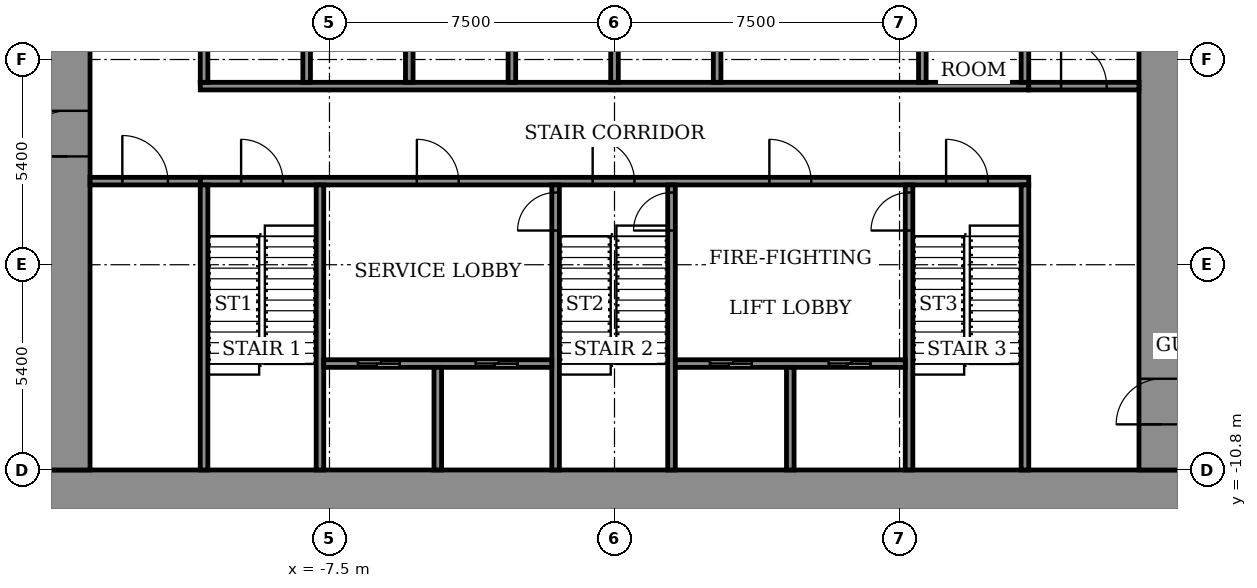
"""IFC4 building model, lengths in metres.
Left out: names, types, materials, properties, quantities, classifications, styles, units other than length and angle.
Written with IfcOpenShell. Run it as: python <this file> out.ifc"""

import sys

from ifc_helpers import new_model, si_unit, direction, frame, frame_2d, origin, place, context, subcontext, project, spatial, rectangle, extrude, element, fill, save


model = new_model("IFC4")
c1 = context("Model", 3, precision=1e-05, world=origin(), true_north=direction((0.0, 1.0)))
c2 = subcontext(c1, "Body", "Model", "MODEL_VIEW")
j1 = project(units=[si_unit("LENGTHUNIT", "METRE"), si_unit("PLANEANGLEUNIT", "RADIAN")], contexts=[c1])
p1 = place(None, origin())
s1 = spatial("IfcSite", under=j1, at=p1, CompositionType="ELEMENT")
p2 = place(p1, origin())
s2 = spatial("IfcBuilding", under=s1, at=p2, CompositionType="ELEMENT")
p3 = place(p2, frame((0.0, 0.0, 16.0)))
s3 = spatial("IfcBuildingStorey", under=s2, at=p3, CompositionType="ELEMENT", Elevation=16.0)
p4 = place(p3, frame((-15.0, -11.4, 0.0), z_axis=(0.0, 0.0, 1.0), x_axis=(1.0, 0.0, 0.0)))
e1 = element("IfcWall", 1, at=p4, inside=s3, PredefinedType="SHEAR", context=c2, shape_type="SweptSolid", body=[
    extrude(rectangle(XDim=30.0, YDim=1.2, at=frame_2d((15.0, 0.0))), origin(), (0.0, 0.0, 1.0), 4.5),
])
p5 = place(p3, frame((-14.4, -10.8, 0.0), z_axis=(0.0, 0.0, 1.0), x_axis=(0.0, 1.0, 0.0)))
e2 = element("IfcWall", 2, at=p5, inside=s3, PredefinedType="SHEAR", context=c2, shape_type="SweptSolid", body=[
    extrude(rectangle(XDim=21.6, YDim=1.2, at=frame_2d((10.8, 0.0))), origin(), (0.0, 0.0, 1.0), 4.5),
])
p6 = place(p5, frame((8.25, 0.0, 0.0)))
e3 = element("IfcOpeningElement", 3, at=p6, cuts=e2, PredefinedType="OPENING", context=c2, shape_type="SweptSolid", body=[
    extrude(rectangle(XDim=1.2, YDim=2.1, at=frame_2d((0.6, 1.05))), frame((0.0, 0.61, 0.0), z_axis=(0.0, -1.0, 0.0), x_axis=(1.0, 0.0, 0.0)), (0.0, 0.0, 1.0), 1.22),
])
p7 = place(p5, frame((15.25, 0.0, 0.0)))
e4 = element("IfcOpeningElement", 4, at=p7, cuts=e2, PredefinedType="OPENING", context=c2, shape_type="SweptSolid", body=[
    extrude(rectangle(XDim=1.2, YDim=2.1, at=frame_2d((0.6, 1.05))), frame((0.0, 0.61, 0.0), z_axis=(0.0, -1.0, 0.0), x_axis=(1.0, 0.0, 0.0)), (0.0, 0.0, 1.0), 1.22),
])
p8 = place(p3, frame((14.4, -10.8, 0.0), z_axis=(0.0, 0.0, 1.0), x_axis=(0.0, 1.0, 0.0)))
e5 = element("IfcWall", 5, at=p8, inside=s3, PredefinedType="SHEAR", context=c2, shape_type="SweptSolid", body=[
    extrude(rectangle(XDim=21.6, YDim=1.2, at=frame_2d((10.8, 0.0))), origin(), (0.0, 0.0, 1.0), 4.5),
])
p9 = place(p8, frame((1.2, 0.0, 0.0)))
e6 = element("IfcOpeningElement", 6, at=p9, cuts=e5, PredefinedType="OPENING", context=c2, shape_type="SweptSolid", body=[
    extrude(rectangle(XDim=1.2, YDim=2.1, at=frame_2d((0.6, 1.05))), frame((0.0, 0.61, 0.0), z_axis=(0.0, -1.0, 0.0), x_axis=(1.0, 0.0, 0.0)), (0.0, 0.0, 1.0), 1.22),
])
p10 = place(p3, frame((-10.9, -3.2, 0.0), z_axis=(0.0, 0.0, 1.0), x_axis=(1.0, 0.0, 0.0)))
e7 = element("IfcWall", 7, at=p10, inside=s3, PredefinedType="SHEAR", context=c2, shape_type="SweptSolid", body=[
    extrude(rectangle(XDim=21.8, YDim=0.2, at=frame_2d((10.9, 0.0))), origin(), (0.0, 0.0, 1.0), 3.95),
])
p11 = place(p10, frame((1.075, 0.0, 0.0)))
e8 = element("IfcOpeningElement", 8, at=p11, cuts=e7, PredefinedType="OPENING", context=c2, shape_type="SweptSolid", body=[
    extrude(rectangle(XDim=1.1, YDim=2.1, at=frame_2d((0.55, 1.05))), frame((0.0, 0.11, 0.0), z_axis=(0.0, -1.0, 0.0), x_axis=(1.0, 0.0, 0.0)), (0.0, 0.0, 1.0), 0.22),
])
p12 = place(p10, frame((10.325, 0.0, 0.0)))
e9 = element("IfcOpeningElement", 9, at=p12, cuts=e7, PredefinedType="OPENING", context=c2, shape_type="SweptSolid", body=[
    extrude(rectangle(XDim=1.1, YDim=2.1, at=frame_2d((0.55, 1.05))), frame((0.0, 0.11, 0.0), z_axis=(0.0, -1.0, 0.0), x_axis=(1.0, 0.0, 0.0)), (0.0, 0.0, 1.0), 0.22),
])
p13 = place(p10, frame((19.625, 0.0, 0.0)))
e10 = element("IfcOpeningElement", 10, at=p13, cuts=e7, PredefinedType="OPENING", context=c2, shape_type="SweptSolid", body=[
    extrude(rectangle(XDim=1.1, YDim=2.1, at=frame_2d((0.55, 1.05))), frame((0.0, 0.11, 0.0), z_axis=(0.0, -1.0, 0.0), x_axis=(1.0, 0.0, 0.0)), (0.0, 0.0, 1.0), 0.22),
])
p14 = place(p10, frame((5.7, 0.0, 0.0)))
e11 = element("IfcOpeningElement", 11, at=p14, cuts=e7, PredefinedType="OPENING", context=c2, shape_type="SweptSolid", body=[
    extrude(rectangle(XDim=1.1, YDim=2.1, at=frame_2d((0.55, 1.05))), frame((0.0, 0.11, 0.0), z_axis=(0.0, -1.0, 0.0), x_axis=(1.0, 0.0, 0.0)), (0.0, 0.0, 1.0), 0.22),
])
p15 = place(p10, frame((14.975, 0.0, 0.0)))
e12 = element("IfcOpeningElement", 12, at=p15, cuts=e7, PredefinedType="OPENING", context=c2, shape_type="SweptSolid", body=[
    extrude(rectangle(XDim=1.1, YDim=2.1, at=frame_2d((0.55, 1.05))), frame((0.0, 0.11, 0.0), z_axis=(0.0, -1.0, 0.0), x_axis=(1.0, 0.0, 0.0)), (0.0, 0.0, 1.0), 0.22),
])
p16 = place(p3, frame((-10.9, -0.7, 0.0), z_axis=(0.0, 0.0, 1.0), x_axis=(1.0, 0.0, 0.0)))
e13 = element("IfcWall", 13, at=p16, inside=s3, PredefinedType="SHEAR", context=c2, shape_type="SweptSolid", body=[
    extrude(rectangle(XDim=21.8, YDim=0.2, at=frame_2d((10.9, 0.0))), origin(), (0.0, 0.0, 1.0), 3.95),
])
for number, where, z_axis, x_axis in (
    (14, (-10.8, -10.8, 0.0), (0.0, 0.0, 1.0), (0.0, 1.0, 0.0)),
    (15, (-7.75, -10.8, 0.0), (0.0, 0.0, 1.0), (0.0, 1.0, 0.0)),
):
    element("IfcWall", number, at=place(p3, frame(where, z_axis=z_axis, x_axis=x_axis)), inside=s3, PredefinedType="SHEAR", context=c2, shape_type="SweptSolid", body=[
        extrude(rectangle(XDim=7.5, YDim=0.2, at=frame_2d((3.75, 0.0))), origin(), (0.0, 0.0, 1.0), 3.95),
    ])
p17 = place(p3, frame((-1.55, -10.8, 0.0), z_axis=(0.0, 0.0, 1.0), x_axis=(0.0, 1.0, 0.0)))
e16 = element("IfcWall", 16, at=p17, inside=s3, PredefinedType="SHEAR", context=c2, shape_type="SweptSolid", body=[
    extrude(rectangle(XDim=7.5, YDim=0.2, at=frame_2d((3.75, 0.0))), origin(), (0.0, 0.0, 1.0), 3.95),
])
p18 = place(p17, frame((6.3, 0.0, 0.0)))
e17 = element("IfcOpeningElement", 17, at=p18, cuts=e16, PredefinedType="OPENING", context=c2, shape_type="SweptSolid", body=[
    extrude(rectangle(XDim=1.0, YDim=2.1, at=frame_2d((0.5, 1.05))), frame((0.0, 0.11, 0.0), z_axis=(0.0, -1.0, 0.0), x_axis=(1.0, 0.0, 0.0)), (0.0, 0.0, 1.0), 0.22),
])
p19 = place(p3, frame((1.5, -10.8, 0.0), z_axis=(0.0, 0.0, 1.0), x_axis=(0.0, 1.0, 0.0)))
e18 = element("IfcWall", 18, at=p19, inside=s3, PredefinedType="SHEAR", context=c2, shape_type="SweptSolid", body=[
    extrude(rectangle(XDim=7.5, YDim=0.2, at=frame_2d((3.75, 0.0))), origin(), (0.0, 0.0, 1.0), 3.95),
])
p20 = place(p19, frame((6.3, 0.0, 0.0)))
e19 = element("IfcOpeningElement", 19, at=p20, cuts=e18, PredefinedType="OPENING", context=c2, shape_type="SweptSolid", body=[
    extrude(rectangle(XDim=1.0, YDim=2.1, at=frame_2d((0.5, 1.05))), frame((0.0, 0.11, 0.0), z_axis=(0.0, -1.0, 0.0), x_axis=(1.0, 0.0, 0.0)), (0.0, 0.0, 1.0), 0.22),
])
p21 = place(p3, frame((7.75, -10.8, 0.0), z_axis=(0.0, 0.0, 1.0), x_axis=(0.0, 1.0, 0.0)))
e20 = element("IfcWall", 20, at=p21, inside=s3, PredefinedType="SHEAR", context=c2, shape_type="SweptSolid", body=[
    extrude(rectangle(XDim=7.5, YDim=0.2, at=frame_2d((3.75, 0.0))), origin(), (0.0, 0.0, 1.0), 3.95),
])
p22 = place(p21, frame((6.3, 0.0, 0.0)))
e21 = element("IfcOpeningElement", 21, at=p22, cuts=e20, PredefinedType="OPENING", context=c2, shape_type="SweptSolid", body=[
    extrude(rectangle(XDim=1.0, YDim=2.1, at=frame_2d((0.5, 1.05))), frame((0.0, 0.11, 0.0), z_axis=(0.0, -1.0, 0.0), x_axis=(1.0, 0.0, 0.0)), (0.0, 0.0, 1.0), 0.22),
])
p23 = place(p3, frame((10.8, -10.8, 0.0), z_axis=(0.0, 0.0, 1.0), x_axis=(0.0, 1.0, 0.0)))
e22 = element("IfcWall", 22, at=p23, inside=s3, PredefinedType="SHEAR", context=c2, shape_type="SweptSolid", body=[
    extrude(rectangle(XDim=7.5, YDim=0.2, at=frame_2d((3.75, 0.0))), origin(), (0.0, 0.0, 1.0), 3.95),
])
p24 = place(p3, frame((-7.65, -8.0, 0.0), z_axis=(0.0, 0.0, 1.0), x_axis=(1.0, 0.0, 0.0)))
e23 = element("IfcWall", 23, at=p24, inside=s3, PredefinedType="SHEAR", context=c2, shape_type="SweptSolid", body=[
    extrude(rectangle(XDim=6.0, YDim=0.2, at=frame_2d((3.0, 0.0))), origin(), (0.0, 0.0, 1.0), 3.95),
])
p25 = place(p24, frame((0.9, 0.0, 0.0)))
e24 = element("IfcOpeningElement", 24, at=p25, cuts=e23, PredefinedType="OPENING", context=c2, shape_type="SweptSolid", body=[
    extrude(rectangle(XDim=1.1, YDim=2.1, at=frame_2d((0.55, 1.05))), frame((0.0, 0.11, 0.0), z_axis=(0.0, -1.0, 0.0), x_axis=(1.0, 0.0, 0.0)), (0.0, 0.0, 1.0), 0.22),
])
p26 = place(p24, frame((4.0, 0.0, 0.0)))
e25 = element("IfcOpeningElement", 25, at=p26, cuts=e23, PredefinedType="OPENING", context=c2, shape_type="SweptSolid", body=[
    extrude(rectangle(XDim=1.1, YDim=2.1, at=frame_2d((0.55, 1.05))), frame((0.0, 0.11, 0.0), z_axis=(0.0, -1.0, 0.0), x_axis=(1.0, 0.0, 0.0)), (0.0, 0.0, 1.0), 0.22),
])
p27 = place(p3, frame((-4.65, -10.8, 0.0), z_axis=(0.0, 0.0, 1.0), x_axis=(0.0, 1.0, 0.0)))
e26 = element("IfcWall", 26, at=p27, inside=s3, PredefinedType="SHEAR", context=c2, shape_type="SweptSolid", body=[
    extrude(rectangle(XDim=2.7, YDim=0.2, at=frame_2d((1.35, 0.0))), origin(), (0.0, 0.0, 1.0), 3.95),
])
p28 = place(p3, frame((1.6, -8.0, 0.0), z_axis=(0.0, 0.0, 1.0), x_axis=(1.0, 0.0, 0.0)))
e27 = element("IfcWall", 27, at=p28, inside=s3, PredefinedType="SHEAR", context=c2, shape_type="SweptSolid", body=[
    extrude(rectangle(XDim=6.05, YDim=0.2, at=frame_2d((3.025, 0.0))), origin(), (0.0, 0.0, 1.0), 3.95),
])
p29 = place(p28, frame((0.913, 0.0, 0.0)))
e28 = element("IfcOpeningElement", 28, at=p29, cuts=e27, PredefinedType="OPENING", context=c2, shape_type="SweptSolid", body=[
    extrude(rectangle(XDim=1.1, YDim=2.1, at=frame_2d((0.55, 1.05))), frame((0.0, 0.11, 0.0), z_axis=(0.0, -1.0, 0.0), x_axis=(1.0, 0.0, 0.0)), (0.0, 0.0, 1.0), 0.22),
])
p30 = place(p28, frame((4.038, 0.0, 0.0)))
e29 = element("IfcOpeningElement", 29, at=p30, cuts=e27, PredefinedType="OPENING", context=c2, shape_type="SweptSolid", body=[
    extrude(rectangle(XDim=1.1, YDim=2.1, at=frame_2d((0.55, 1.05))), frame((0.0, 0.11, 0.0), z_axis=(0.0, -1.0, 0.0), x_axis=(1.0, 0.0, 0.0)), (0.0, 0.0, 1.0), 0.22),
])
p31 = place(p3, frame((4.625, -10.8, 0.0), z_axis=(0.0, 0.0, 1.0), x_axis=(0.0, 1.0, 0.0)))
e30 = element("IfcWall", 30, at=p31, inside=s3, PredefinedType="SHEAR", context=c2, shape_type="SweptSolid", body=[
    extrude(rectangle(XDim=2.7, YDim=0.2, at=frame_2d((1.35, 0.0))), origin(), (0.0, 0.0, 1.0), 3.95),
])
for number, where, z_axis, x_axis in (
    (31, (-10.8, -0.6, 0.0), (0.0, 0.0, 1.0), (0.0, 1.0, 0.0)),
    (32, (-8.1, -0.6, 0.0), (0.0, 0.0, 1.0), (0.0, 1.0, 0.0)),
    (33, (-5.4, -0.6, 0.0), (0.0, 0.0, 1.0), (0.0, 1.0, 0.0)),
    (34, (-2.7, -0.6, 0.0), (0.0, 0.0, 1.0), (0.0, 1.0, 0.0)),
    (35, (0.0, -0.6, 0.0), (0.0, 0.0, 1.0), (0.0, 1.0, 0.0)),
    (36, (2.7, -0.6, 0.0), (0.0, 0.0, 1.0), (0.0, 1.0, 0.0)),
):
    element("IfcWall", number, at=place(p3, frame(where, z_axis=z_axis, x_axis=x_axis)), inside=s3, PredefinedType="SHEAR", context=c2, shape_type="SweptSolid", body=[
        extrude(rectangle(XDim=2.5, YDim=0.2, at=frame_2d((1.25, 0.0))), origin(), (0.0, 0.0, 1.0), 3.95),
    ])
for number, where, z_axis, x_axis in (
    (37, (8.1, -0.6, 0.0), (0.0, 0.0, 1.0), (0.0, 1.0, 0.0)),
    (38, (10.8, -0.6, 0.0), (0.0, 0.0, 1.0), (0.0, 1.0, 0.0)),
):
    element("IfcWall", number, at=place(p3, frame(where, z_axis=z_axis, x_axis=x_axis)), inside=s3, PredefinedType="STANDARD", context=c2, shape_type="SweptSolid", body=[
        extrude(rectangle(XDim=2.5, YDim=0.2, at=frame_2d((1.25, 0.0))), origin(), (0.0, 0.0, 1.0), 3.95),
    ])
p32 = place(p3, frame((-13.8, -3.2, 0.0), z_axis=(0.0, 0.0, 1.0), x_axis=(1.0, 0.0, 0.0)))
e39 = element("IfcWall", 39, at=p32, inside=s3, PredefinedType="STANDARD", context=c2, shape_type="SweptSolid", body=[
    extrude(rectangle(XDim=2.9, YDim=0.2, at=frame_2d((1.45, 0.0))), origin(), (0.0, 0.0, 1.0), 3.95),
])
p33 = place(p32, frame((0.85, 0.0, 0.0)))
e40 = element("IfcOpeningElement", 40, at=p33, cuts=e39, PredefinedType="OPENING", context=c2, shape_type="SweptSolid", body=[
    extrude(rectangle(XDim=1.2, YDim=2.1, at=frame_2d((0.6, 1.05))), frame((0.0, 0.11, 0.0), z_axis=(0.0, -1.0, 0.0), x_axis=(1.0, 0.0, 0.0)), (0.0, 0.0, 1.0), 0.22),
])
p34 = place(p3, frame((10.9, -0.7, 0.0), z_axis=(0.0, 0.0, 1.0), x_axis=(1.0, 0.0, 0.0)))
e41 = element("IfcWall", 41, at=p34, inside=s3, PredefinedType="STANDARD", context=c2, shape_type="SweptSolid", body=[
    extrude(rectangle(XDim=2.9, YDim=0.2, at=frame_2d((1.45, 0.0))), origin(), (0.0, 0.0, 1.0), 3.95),
])
p35 = place(p34, frame((0.85, 0.0, 0.0)))
e42 = element("IfcOpeningElement", 42, at=p35, cuts=e41, PredefinedType="OPENING", context=c2, shape_type="SweptSolid", body=[
    extrude(rectangle(XDim=1.2, YDim=2.1, at=frame_2d((0.6, 1.05))), frame((0.0, 0.11, 0.0), z_axis=(0.0, -1.0, 0.0), x_axis=(1.0, 0.0, 0.0)), (0.0, 0.0, 1.0), 0.22),
])
p36 = place(p6, origin())
e43 = element("IfcDoor", 43, at=p36, inside=s3, OperationType="DOUBLE_DOOR_SINGLE_SWING", PredefinedType="DOOR", context=c2, shape_type="SweptSolid", body=[
    extrude(rectangle(XDim=1.2, YDim=2.1, at=frame_2d((0.6, 1.05))), frame((0.0, 0.025, 0.0), z_axis=(0.0, -1.0, 0.0), x_axis=(1.0, 0.0, 0.0)), (0.0, 0.0, 1.0), 0.05),
])
fill(e3, e43)
p37 = place(p9, origin())
e44 = element("IfcDoor", 44, at=p37, inside=s3, OperationType="DOUBLE_DOOR_SINGLE_SWING", PredefinedType="DOOR", context=c2, shape_type="SweptSolid", body=[
    extrude(rectangle(XDim=1.2, YDim=2.1, at=frame_2d((0.6, 1.05))), frame((0.0, 0.025, 0.0), z_axis=(0.0, -1.0, 0.0), x_axis=(1.0, 0.0, 0.0)), (0.0, 0.0, 1.0), 0.05),
])
fill(e6, e44)
p38 = place(p29, origin())
e45 = element("IfcDoor", 45, at=p38, inside=s3, OperationType="SLIDING_TO_LEFT", PredefinedType="DOOR", context=c2, shape_type="SweptSolid", body=[
    extrude(rectangle(XDim=1.1, YDim=2.1, at=frame_2d((0.55, 1.05))), frame((0.0, 0.025, 0.0), z_axis=(0.0, -1.0, 0.0), x_axis=(1.0, 0.0, 0.0)), (0.0, 0.0, 1.0), 0.05),
])
fill(e28, e45)
p39 = place(p25, origin())
e46 = element("IfcDoor", 46, at=p39, inside=s3, OperationType="SLIDING_TO_LEFT", PredefinedType="DOOR", context=c2, shape_type="SweptSolid", body=[
    extrude(rectangle(XDim=1.1, YDim=2.1, at=frame_2d((0.55, 1.05))), frame((0.0, 0.025, 0.0), z_axis=(0.0, -1.0, 0.0), x_axis=(1.0, 0.0, 0.0)), (0.0, 0.0, 1.0), 0.05),
])
fill(e24, e46)
p40 = place(p30, origin())
e47 = element("IfcDoor", 47, at=p40, inside=s3, OperationType="SLIDING_TO_LEFT", PredefinedType="DOOR", context=c2, shape_type="SweptSolid", body=[
    extrude(rectangle(XDim=1.1, YDim=2.1, at=frame_2d((0.55, 1.05))), frame((0.0, 0.025, 0.0), z_axis=(0.0, -1.0, 0.0), x_axis=(1.0, 0.0, 0.0)), (0.0, 0.0, 1.0), 0.05),
])
fill(e29, e47)
p41 = place(p26, origin())
e48 = element("IfcDoor", 48, at=p41, inside=s3, OperationType="SLIDING_TO_LEFT", PredefinedType="DOOR", context=c2, shape_type="SweptSolid", body=[
    extrude(rectangle(XDim=1.1, YDim=2.1, at=frame_2d((0.55, 1.05))), frame((0.0, 0.025, 0.0), z_axis=(0.0, -1.0, 0.0), x_axis=(1.0, 0.0, 0.0)), (0.0, 0.0, 1.0), 0.05),
])
fill(e25, e48)
p42 = place(p11, origin())
e49 = element("IfcDoor", 49, at=p42, inside=s3, OperationType="SINGLE_SWING_RIGHT", PredefinedType="DOOR", context=c2, shape_type="SweptSolid", body=[
    extrude(rectangle(XDim=1.1, YDim=2.1, at=frame_2d((0.55, 1.05))), frame((0.0, 0.025, 0.0), z_axis=(0.0, -1.0, 0.0), x_axis=(1.0, 0.0, 0.0)), (0.0, 0.0, 1.0), 0.05),
])
fill(e8, e49)
p43 = place(p12, origin())
e50 = element("IfcDoor", 50, at=p43, inside=s3, OperationType="SINGLE_SWING_RIGHT", PredefinedType="DOOR", context=c2, shape_type="SweptSolid", body=[
    extrude(rectangle(XDim=1.1, YDim=2.1, at=frame_2d((0.55, 1.05))), frame((0.0, 0.025, 0.0), z_axis=(0.0, -1.0, 0.0), x_axis=(1.0, 0.0, 0.0)), (0.0, 0.0, 1.0), 0.05),
])
fill(e9, e50)
p44 = place(p13, origin())
e51 = element("IfcDoor", 51, at=p44, inside=s3, OperationType="SINGLE_SWING_RIGHT", PredefinedType="DOOR", context=c2, shape_type="SweptSolid", body=[
    extrude(rectangle(XDim=1.1, YDim=2.1, at=frame_2d((0.55, 1.05))), frame((0.0, 0.025, 0.0), z_axis=(0.0, -1.0, 0.0), x_axis=(1.0, 0.0, 0.0)), (0.0, 0.0, 1.0), 0.05),
])
fill(e10, e51)
p45 = place(p14, origin())
e52 = element("IfcDoor", 52, at=p45, inside=s3, OperationType="SINGLE_SWING_LEFT", PredefinedType="DOOR", context=c2, shape_type="SweptSolid", body=[
    extrude(rectangle(XDim=1.1, YDim=2.1, at=frame_2d((0.55, 1.05))), frame((0.0, 0.025, 0.0), z_axis=(0.0, -1.0, 0.0), x_axis=(1.0, 0.0, 0.0)), (0.0, 0.0, 1.0), 0.05),
])
fill(e11, e52)
p46 = place(p15, origin())
e53 = element("IfcDoor", 53, at=p46, inside=s3, OperationType="SINGLE_SWING_LEFT", PredefinedType="DOOR", context=c2, shape_type="SweptSolid", body=[
    extrude(rectangle(XDim=1.1, YDim=2.1, at=frame_2d((0.55, 1.05))), frame((0.0, 0.025, 0.0), z_axis=(0.0, -1.0, 0.0), x_axis=(1.0, 0.0, 0.0)), (0.0, 0.0, 1.0), 0.05),
])
fill(e12, e53)
p47 = place(p18, origin())
e54 = element("IfcDoor", 54, at=p47, inside=s3, OperationType="SINGLE_SWING_RIGHT", PredefinedType="DOOR", context=c2, shape_type="SweptSolid", body=[
    extrude(rectangle(XDim=1.0, YDim=2.1, at=frame_2d((0.5, 1.05))), frame((0.0, 0.025, 0.0), z_axis=(0.0, -1.0, 0.0), x_axis=(1.0, 0.0, 0.0)), (0.0, 0.0, 1.0), 0.05),
])
fill(e17, e54)
p48 = place(p20, origin())
e55 = element("IfcDoor", 55, at=p48, inside=s3, OperationType="SINGLE_SWING_RIGHT", PredefinedType="DOOR", context=c2, shape_type="SweptSolid", body=[
    extrude(rectangle(XDim=1.0, YDim=2.1, at=frame_2d((0.5, 1.05))), frame((0.0, 0.025, 0.0), z_axis=(0.0, -1.0, 0.0), x_axis=(1.0, 0.0, 0.0)), (0.0, 0.0, 1.0), 0.05),
])
fill(e19, e55)
p49 = place(p22, origin())
e56 = element("IfcDoor", 56, at=p49, inside=s3, OperationType="SINGLE_SWING_RIGHT", PredefinedType="DOOR", context=c2, shape_type="SweptSolid", body=[
    extrude(rectangle(XDim=1.0, YDim=2.1, at=frame_2d((0.5, 1.05))), frame((0.0, 0.025, 0.0), z_axis=(0.0, -1.0, 0.0), x_axis=(1.0, 0.0, 0.0)), (0.0, 0.0, 1.0), 0.05),
])
fill(e21, e56)
p50 = place(p33, origin())
e57 = element("IfcDoor", 57, at=p50, inside=s3, OperationType="SINGLE_SWING_LEFT", PredefinedType="DOOR", context=c2, shape_type="SweptSolid", body=[
    extrude(rectangle(XDim=1.2, YDim=2.1, at=frame_2d((0.6, 1.05))), frame((0.0, 0.025, 0.0), z_axis=(0.0, -1.0, 0.0), x_axis=(1.0, 0.0, 0.0)), (0.0, 0.0, 1.0), 0.05),
])
fill(e40, e57)
p51 = place(p35, origin())
e58 = element("IfcDoor", 58, at=p51, inside=s3, OperationType="SINGLE_SWING_LEFT", PredefinedType="DOOR", context=c2, shape_type="SweptSolid", body=[
    extrude(rectangle(XDim=1.2, YDim=2.1, at=frame_2d((0.6, 1.05))), frame((0.0, 0.025, 0.0), z_axis=(0.0, -1.0, 0.0), x_axis=(1.0, 0.0, 0.0)), (0.0, 0.0, 1.0), 0.05),
])
fill(e42, e58)
save(model, sys.argv[1])
